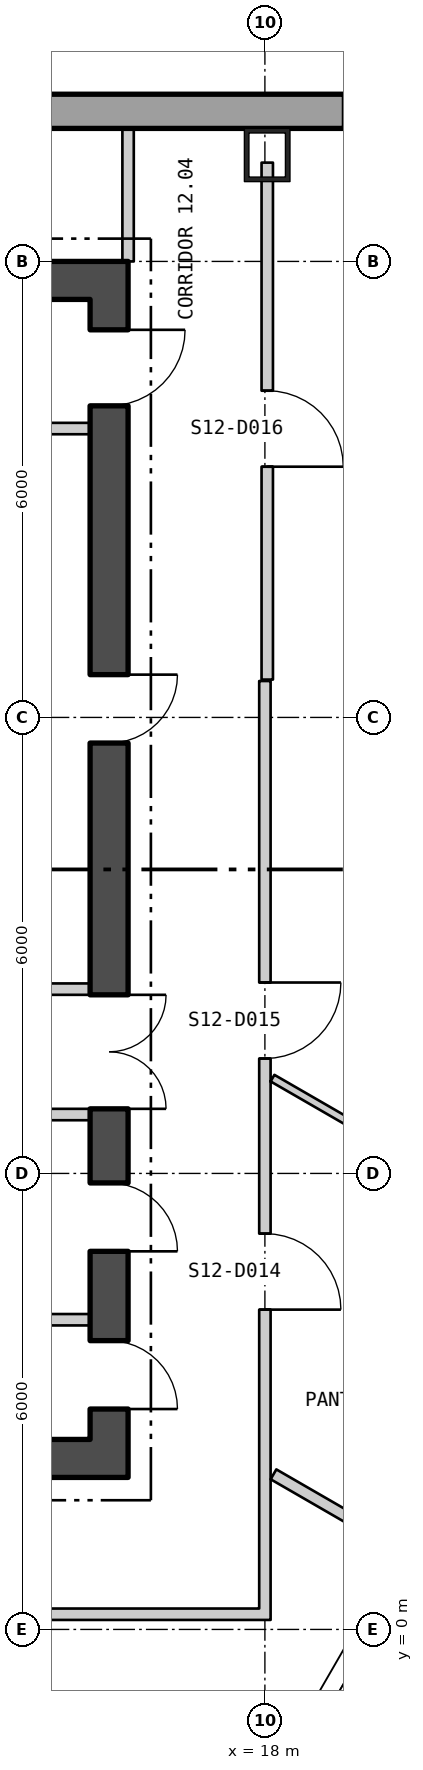
"""IFC4 building model, lengths in metres.
Left out: names, types, materials, properties, quantities, classifications, styles, units other than length and angle.
Written with IfcOpenShell. Run it as: python <this file> out.ifc"""

import sys

from ifc_helpers import new_model, si_unit, direction, frame, frame_2d, origin, origin_2d, place, context, subcontext, project, spatial, polyline, rectangle, hollow_rectangle, outline, extrude, element, fill, save


model = new_model("IFC4")
c1 = context("Model", 3, precision=1e-05, world=origin(), true_north=direction((0.0, 1.0)))
c2 = subcontext(c1, "Body", "Model", "MODEL_VIEW")
j1 = project(units=[si_unit("LENGTHUNIT", "METRE"), si_unit("PLANEANGLEUNIT", "RADIAN")], contexts=[c1])
p1 = place(None, origin())
s1 = spatial("IfcSite", under=j1, at=p1, CompositionType="ELEMENT")
p2 = place(p1, origin())
s2 = spatial("IfcBuilding", under=s1, at=p2, CompositionType="ELEMENT")
p3 = place(p2, frame((0.0, 0.0, 163.2)))
s3 = spatial("IfcBuildingStorey", under=s2, at=p3, CompositionType="ELEMENT", Elevation=163.2)
p4 = place(p3, frame((18.03, 19.4, 0.0), z_axis=(0.0, 0.0, 1.0), x_axis=(-1.0, 0.0, 0.0)))
e1 = element("IfcColumn", 1, at=p4, inside=s3, PredefinedType="COLUMN", context=c2, shape_type="SweptSolid", body=[
    extrude(hollow_rectangle(XDim=0.6, YDim=0.7, WallThickness=0.06, at=origin_2d()), origin(), (0.0, 0.0, 1.0), 3.9),
])
p5 = place(p3, frame((22.87, 19.975, -0.4), z_axis=(0.0, 0.0, 1.0), x_axis=(-1.0, 0.0, 0.0)))
e2 = element("IfcWall", 2, at=p5, inside=s3, PredefinedType="SOLIDWALL", context=c2, shape_type="SweptSolid", body=[
    extrude(outline(polyline([(-0.13, -0.225), (45.87, -0.225), (45.61, 0.225), (0.13, 0.225), (-0.13, -0.225)])), origin(), (0.0, 0.0, 1.0), 3.9),
])
p6 = place(p5, frame((1.424, 0.0, 1.3)))
e3 = element("IfcOpeningElement", 3, at=p6, cuts=e2, PredefinedType="OPENING", context=c2, shape_type="SweptSolid", body=[
    extrude(rectangle(XDim=2.4, YDim=2.0, at=frame_2d((1.2, 1.0))), frame((0.0, 0.235, 0.0), z_axis=(0.0, -1.0, 0.0), x_axis=(1.0, 0.0, 0.0)), (0.0, 0.0, 1.0), 0.47),
])
p7 = place(p5, frame((10.401, 0.0, 1.3)))
e4 = element("IfcOpeningElement", 4, at=p7, cuts=e2, PredefinedType="OPENING", context=c2, shape_type="SweptSolid", body=[
    extrude(rectangle(XDim=2.4, YDim=2.0, at=frame_2d((1.2, 1.0))), frame((0.0, 0.235, 0.0), z_axis=(0.0, -1.0, 0.0), x_axis=(1.0, 0.0, 0.0)), (0.0, 0.0, 1.0), 0.47),
])
p8 = place(p5, frame((14.909, 0.0, 1.3)))
e5 = element("IfcOpeningElement", 5, at=p8, cuts=e2, PredefinedType="OPENING", context=c2, shape_type="SweptSolid", body=[
    extrude(rectangle(XDim=2.4, YDim=2.0, at=frame_2d((1.2, 1.0))), frame((0.0, 0.235, 0.0), z_axis=(0.0, -1.0, 0.0), x_axis=(1.0, 0.0, 0.0)), (0.0, 0.0, 1.0), 0.47),
])
p9 = place(p5, frame((19.416, 0.0, 1.3)))
e6 = element("IfcOpeningElement", 6, at=p9, cuts=e2, PredefinedType="OPENING", context=c2, shape_type="SweptSolid", body=[
    extrude(rectangle(XDim=2.4, YDim=2.0, at=frame_2d((1.2, 1.0))), frame((0.0, 0.235, 0.0), z_axis=(0.0, -1.0, 0.0), x_axis=(1.0, 0.0, 0.0)), (0.0, 0.0, 1.0), 0.47),
])
p10 = place(p5, frame((23.924, 0.0, 1.3)))
e7 = element("IfcOpeningElement", 7, at=p10, cuts=e2, PredefinedType="OPENING", context=c2, shape_type="SweptSolid", body=[
    extrude(rectangle(XDim=2.4, YDim=2.0, at=frame_2d((1.2, 1.0))), frame((0.0, 0.235, 0.0), z_axis=(0.0, -1.0, 0.0), x_axis=(1.0, 0.0, 0.0)), (0.0, 0.0, 1.0), 0.47),
])
p11 = place(p5, frame((28.431, 0.0, 1.3)))
e8 = element("IfcOpeningElement", 8, at=p11, cuts=e2, PredefinedType="OPENING", context=c2, shape_type="SweptSolid", body=[
    extrude(rectangle(XDim=2.4, YDim=2.0, at=frame_2d((1.2, 1.0))), frame((0.0, 0.235, 0.0), z_axis=(0.0, -1.0, 0.0), x_axis=(1.0, 0.0, 0.0)), (0.0, 0.0, 1.0), 0.47),
])
p12 = place(p5, frame((32.939, 0.0, 1.3)))
e9 = element("IfcOpeningElement", 9, at=p12, cuts=e2, PredefinedType="OPENING", context=c2, shape_type="SweptSolid", body=[
    extrude(rectangle(XDim=2.4, YDim=2.0, at=frame_2d((1.2, 1.0))), frame((0.0, 0.235, 0.0), z_axis=(0.0, -1.0, 0.0), x_axis=(1.0, 0.0, 0.0)), (0.0, 0.0, 1.0), 0.47),
])
p13 = place(p5, frame((37.447, 0.0, 1.3)))
e10 = element("IfcOpeningElement", 10, at=p13, cuts=e2, PredefinedType="OPENING", context=c2, shape_type="SweptSolid", body=[
    extrude(rectangle(XDim=2.4, YDim=2.0, at=frame_2d((1.2, 1.0))), frame((0.0, 0.235, 0.0), z_axis=(0.0, -1.0, 0.0), x_axis=(1.0, 0.0, 0.0)), (0.0, 0.0, 1.0), 0.47),
])
p14 = place(p5, frame((41.916, 0.0, 1.3)))
e11 = element("IfcOpeningElement", 11, at=p14, cuts=e2, PredefinedType="OPENING", context=c2, shape_type="SweptSolid", body=[
    extrude(rectangle(XDim=2.4, YDim=2.0, at=frame_2d((1.2, 1.0))), frame((0.0, 0.235, 0.0), z_axis=(0.0, -1.0, 0.0), x_axis=(1.0, 0.0, 0.0)), (0.0, 0.0, 1.0), 0.47),
])
p15 = place(p3, frame((4.055, -26.661, -0.18), z_axis=(0.0, 0.0, 1.0), x_axis=(0.499999764979, 0.866025539474, 0.0)))
e12 = element("IfcWall", 12, at=p15, inside=s3, PredefinedType="SOLIDWALL", context=c2, shape_type="SweptSolid", body=[
    extrude(outline(polyline([(-0.13, -0.225), (45.87, -0.225), (45.61, 0.225), (0.13, 0.225), (-0.13, -0.225)])), origin(), (0.0, 0.0, 1.0), 3.68),
])
p16 = place(p15, frame((1.424, 0.0, 1.08)))
e13 = element("IfcOpeningElement", 13, at=p16, cuts=e12, PredefinedType="OPENING", context=c2, shape_type="SweptSolid", body=[
    extrude(rectangle(XDim=2.4, YDim=2.0, at=frame_2d((1.2, 1.0))), frame((0.0, 0.235, 0.0), z_axis=(0.0, -1.0, 0.0), x_axis=(1.0, 0.0, 0.0)), (0.0, 0.0, 1.0), 0.47),
])
p17 = place(p15, frame((5.893, 0.0, 1.08)))
e14 = element("IfcOpeningElement", 14, at=p17, cuts=e12, PredefinedType="OPENING", context=c2, shape_type="SweptSolid", body=[
    extrude(rectangle(XDim=2.4, YDim=2.0, at=frame_2d((1.2, 1.0))), frame((0.0, 0.235, 0.0), z_axis=(0.0, -1.0, 0.0), x_axis=(1.0, 0.0, 0.0)), (0.0, 0.0, 1.0), 0.47),
])
p18 = place(p15, frame((10.401, 0.0, 1.08)))
e15 = element("IfcOpeningElement", 15, at=p18, cuts=e12, PredefinedType="OPENING", context=c2, shape_type="SweptSolid", body=[
    extrude(rectangle(XDim=2.4, YDim=2.0, at=frame_2d((1.2, 1.0))), frame((0.0, 0.235, 0.0), z_axis=(0.0, -1.0, 0.0), x_axis=(1.0, 0.0, 0.0)), (0.0, 0.0, 1.0), 0.47),
])
p19 = place(p15, frame((14.909, 0.0, 1.08)))
e16 = element("IfcOpeningElement", 16, at=p19, cuts=e12, PredefinedType="OPENING", context=c2, shape_type="SweptSolid", body=[
    extrude(rectangle(XDim=2.4, YDim=2.0, at=frame_2d((1.2, 1.0))), frame((0.0, 0.235, 0.0), z_axis=(0.0, -1.0, 0.0), x_axis=(1.0, 0.0, 0.0)), (0.0, 0.0, 1.0), 0.47),
])
p20 = place(p15, frame((19.416, 0.0, 1.08)))
e17 = element("IfcOpeningElement", 17, at=p20, cuts=e12, PredefinedType="OPENING", context=c2, shape_type="SweptSolid", body=[
    extrude(rectangle(XDim=2.4, YDim=2.0, at=frame_2d((1.2, 1.0))), frame((0.0, 0.235, 0.0), z_axis=(0.0, -1.0, 0.0), x_axis=(1.0, 0.0, 0.0)), (0.0, 0.0, 1.0), 0.47),
])
p21 = place(p15, frame((23.924, 0.0, 1.08)))
e18 = element("IfcOpeningElement", 18, at=p21, cuts=e12, PredefinedType="OPENING", context=c2, shape_type="SweptSolid", body=[
    extrude(rectangle(XDim=2.4, YDim=2.0, at=frame_2d((1.2, 1.0))), frame((0.0, 0.235, 0.0), z_axis=(0.0, -1.0, 0.0), x_axis=(1.0, 0.0, 0.0)), (0.0, 0.0, 1.0), 0.47),
])
p22 = place(p15, frame((28.431, 0.0, 1.08)))
e19 = element("IfcOpeningElement", 19, at=p22, cuts=e12, PredefinedType="OPENING", context=c2, shape_type="SweptSolid", body=[
    extrude(rectangle(XDim=2.4, YDim=2.0, at=frame_2d((1.2, 1.0))), frame((0.0, 0.235, 0.0), z_axis=(0.0, -1.0, 0.0), x_axis=(1.0, 0.0, 0.0)), (0.0, 0.0, 1.0), 0.47),
])
p23 = place(p15, frame((32.939, 0.0, 1.08)))
e20 = element("IfcOpeningElement", 20, at=p23, cuts=e12, PredefinedType="OPENING", context=c2, shape_type="SweptSolid", body=[
    extrude(rectangle(XDim=2.4, YDim=2.0, at=frame_2d((1.2, 1.0))), frame((0.0, 0.235, 0.0), z_axis=(0.0, -1.0, 0.0), x_axis=(1.0, 0.0, 0.0)), (0.0, 0.0, 1.0), 0.47),
])
p24 = place(p15, frame((37.447, 0.0, 1.08)))
e21 = element("IfcOpeningElement", 21, at=p24, cuts=e12, PredefinedType="OPENING", context=c2, shape_type="SweptSolid", body=[
    extrude(rectangle(XDim=2.4, YDim=2.0, at=frame_2d((1.2, 1.0))), frame((0.0, 0.235, 0.0), z_axis=(0.0, -1.0, 0.0), x_axis=(1.0, 0.0, 0.0)), (0.0, 0.0, 1.0), 0.47),
])
p25 = place(p15, frame((41.916, 0.0, 1.08)))
e22 = element("IfcOpeningElement", 22, at=p25, cuts=e12, PredefinedType="OPENING", context=c2, shape_type="SweptSolid", body=[
    extrude(rectangle(XDim=2.4, YDim=2.0, at=frame_2d((1.2, 1.0))), frame((0.0, 0.235, 0.0), z_axis=(0.0, -1.0, 0.0), x_axis=(1.0, 0.0, 0.0)), (0.0, 0.0, 1.0), 0.47),
])
p26 = place(p3, frame((-16.2, 2.25, 0.0), z_axis=(0.0, 0.0, 1.0), x_axis=(1.0, 0.0, 0.0)))
e23 = element("IfcWall", 23, at=p26, inside=s3, PredefinedType="SHEAR", context=c2, shape_type="SweptSolid", body=[
    extrude(rectangle(XDim=32.4, YDim=0.5, at=frame_2d((16.2, 0.0))), origin(), (0.0, 0.0, 1.0), 3.7),
])
p27 = place(p26, frame((10.7, 0.0, 0.0)))
e24 = element("IfcOpeningElement", 24, at=p27, cuts=e23, PredefinedType="OPENING", context=c2, shape_type="SweptSolid", body=[
    extrude(rectangle(XDim=1.8, YDim=2.4, at=frame_2d((0.9, 1.2))), frame((0.0, 0.26, 0.0), z_axis=(0.0, -1.0, 0.0), x_axis=(1.0, 0.0, 0.0)), (0.0, 0.0, 1.0), 0.52),
])
p28 = place(p26, frame((20.7, 0.0, 0.0)))
e25 = element("IfcOpeningElement", 25, at=p28, cuts=e23, PredefinedType="OPENING", context=c2, shape_type="SweptSolid", body=[
    extrude(rectangle(XDim=1.8, YDim=2.4, at=frame_2d((0.9, 1.2))), frame((0.0, 0.26, 0.0), z_axis=(0.0, -1.0, 0.0), x_axis=(1.0, 0.0, 0.0)), (0.0, 0.0, 1.0), 0.52),
])
p29 = place(p3, frame((-16.2, 17.75, 0.0), z_axis=(0.0, 0.0, 1.0), x_axis=(1.0, 0.0, 0.0)))
e26 = element("IfcWall", 26, at=p29, inside=s3, PredefinedType="SHEAR", context=c2, shape_type="SweptSolid", body=[
    extrude(rectangle(XDim=32.4, YDim=0.5, at=frame_2d((16.2, 0.0))), origin(), (0.0, 0.0, 1.0), 3.7),
])
p30 = place(p3, frame((15.95, 2.5, 0.0), z_axis=(0.0, 0.0, 1.0), x_axis=(0.0, 1.0, 0.0)))
e27 = element("IfcWall", 27, at=p30, inside=s3, PredefinedType="SHEAR", context=c2, shape_type="SweptSolid", body=[
    extrude(rectangle(XDim=15.0, YDim=0.5, at=frame_2d((7.5, 0.0))), origin(), (0.0, 0.0, 1.0), 3.7),
])
p31 = place(p30, frame((4.35, 0.0, 0.0)))
e28 = element("IfcOpeningElement", 28, at=p31, cuts=e27, PredefinedType="OPENING", context=c2, shape_type="SweptSolid", body=[
    extrude(rectangle(XDim=1.5, YDim=2.1, at=frame_2d((0.75, 1.05))), frame((0.0, 0.26, 0.0), z_axis=(0.0, -1.0, 0.0), x_axis=(1.0, 0.0, 0.0)), (0.0, 0.0, 1.0), 0.52),
])
p32 = place(p30, frame((0.4, 0.0, 0.0)))
e29 = element("IfcOpeningElement", 29, at=p32, cuts=e27, PredefinedType="OPENING", context=c2, shape_type="SweptSolid", body=[
    extrude(rectangle(XDim=0.9, YDim=2.1, at=frame_2d((0.45, 1.05))), frame((0.0, 0.26, 0.0), z_axis=(0.0, -1.0, 0.0), x_axis=(1.0, 0.0, 0.0)), (0.0, 0.0, 1.0), 0.52),
])
p33 = place(p30, frame((2.475, 0.0, 0.0)))
e30 = element("IfcOpeningElement", 30, at=p33, cuts=e27, PredefinedType="OPENING", context=c2, shape_type="SweptSolid", body=[
    extrude(rectangle(XDim=0.9, YDim=2.1, at=frame_2d((0.45, 1.05))), frame((0.0, 0.26, 0.0), z_axis=(0.0, -1.0, 0.0), x_axis=(1.0, 0.0, 0.0)), (0.0, 0.0, 1.0), 0.52),
])
p34 = place(p30, frame((9.163, 0.0, 0.0)))
e31 = element("IfcOpeningElement", 31, at=p34, cuts=e27, PredefinedType="OPENING", context=c2, shape_type="SweptSolid", body=[
    extrude(rectangle(XDim=0.9, YDim=2.1, at=frame_2d((0.45, 1.05))), frame((0.0, 0.26, 0.0), z_axis=(0.0, -1.0, 0.0), x_axis=(1.0, 0.0, 0.0)), (0.0, 0.0, 1.0), 0.52),
])
p35 = place(p30, frame((13.6, 0.0, 0.0)))
e32 = element("IfcOpeningElement", 32, at=p35, cuts=e27, PredefinedType="OPENING", context=c2, shape_type="SweptSolid", body=[
    extrude(rectangle(XDim=1.0, YDim=2.1, at=frame_2d((0.5, 1.05))), frame((0.0, 0.26, 0.0), z_axis=(0.0, -1.0, 0.0), x_axis=(1.0, 0.0, 0.0)), (0.0, 0.0, 1.0), 0.52),
])
for number, where, z_axis, x_axis in (
    (33, (14.5, 6.775, 0.0), (0.0, 0.0, 1.0), (1.0, 0.0, 0.0)),
    (34, (14.5, 8.425, 0.0), (0.0, 0.0, 1.0), (1.0, 0.0, 0.0)),
    (35, (14.5, 4.075, 0.0), (0.0, 0.0, 1.0), (1.0, 0.0, 0.0)),
    (36, (14.5, 15.801, 0.0), (0.0, 0.0, 1.0), (1.0, 0.0, 0.0)),
):
    element("IfcWall", number, at=place(p3, frame(where, z_axis=z_axis, x_axis=x_axis)), inside=s3, PredefinedType="PARTITIONING", context=c2, shape_type="SweptSolid", body=[
        extrude(rectangle(XDim=1.2, YDim=0.15, at=frame_2d((0.6, 0.0))), origin(), (0.0, 0.0, 1.0), 3.7),
    ])
p36 = place(p3, frame((7.09, 0.2, 0.0), z_axis=(0.0, 0.0, 1.0), x_axis=(1.0, 0.0, 0.0)))
e37 = element("IfcWall", 37, at=p36, inside=s3, PredefinedType="PARTITIONING", context=c2, shape_type="SweptSolid", body=[
    extrude(rectangle(XDim=10.835, YDim=0.15, at=frame_2d((5.418, 0.0))), origin(), (0.0, 0.0, 1.0), 3.7),
])
p37 = place(p3, frame((16.2, 18.0, 0.0), z_axis=(0.0, 0.0, 1.0), x_axis=(0.0, 1.0, 0.0)))
e38 = element("IfcWall", 38, at=p37, inside=s3, PredefinedType="PARTITIONING", context=c2, shape_type="SweptSolid", body=[
    extrude(rectangle(XDim=1.75, YDim=0.15, at=frame_2d((0.875, 0.0))), origin(), (0.0, 0.0, 1.0), 3.7),
])
p38 = place(p3, frame((18.0, 0.125, 0.0), z_axis=(0.0, 0.0, 1.0), x_axis=(0.0, 1.0, 0.0)))
e39 = element("IfcWall", 39, at=p38, inside=s3, PredefinedType="PARTITIONING", context=c2, shape_type="SweptSolid", body=[
    extrude(rectangle(XDim=12.354, YDim=0.15, at=frame_2d((6.177, 0.0))), origin(), (0.0, 0.0, 1.0), 3.7),
])
p39 = place(p38, frame((4.083, 0.0, 0.0)))
e40 = element("IfcOpeningElement", 40, at=p39, cuts=e39, PredefinedType="OPENING", context=c2, shape_type="SweptSolid", body=[
    extrude(rectangle(XDim=1.0, YDim=2.1, at=frame_2d((0.5, 1.05))), frame((0.0, 0.085, 0.0), z_axis=(0.0, -1.0, 0.0), x_axis=(1.0, 0.0, 0.0)), (0.0, 0.0, 1.0), 0.17),
])
p40 = place(p38, frame((7.387, 0.0, 0.0)))
e41 = element("IfcOpeningElement", 41, at=p40, cuts=e39, PredefinedType="OPENING", context=c2, shape_type="SweptSolid", body=[
    extrude(rectangle(XDim=1.0, YDim=2.1, at=frame_2d((0.5, 1.05))), frame((0.0, 0.085, 0.0), z_axis=(0.0, -1.0, 0.0), x_axis=(1.0, 0.0, 0.0)), (0.0, 0.0, 1.0), 0.17),
])
p41 = place(p3, frame((18.031, 12.498, 0.0), z_axis=(0.0, 0.0, 1.0), x_axis=(0.0, 1.0, 0.0)))
e42 = element("IfcWall", 42, at=p41, inside=s3, PredefinedType="PARTITIONING", context=c2, shape_type="SweptSolid", body=[
    extrude(rectangle(XDim=6.802, YDim=0.15, at=frame_2d((3.401, 0.0))), origin(), (0.0, 0.0, 1.0), 3.7),
])
p42 = place(p41, frame((2.801, 0.0, 0.0)))
e43 = element("IfcOpeningElement", 43, at=p42, cuts=e42, PredefinedType="OPENING", context=c2, shape_type="SweptSolid", body=[
    extrude(rectangle(XDim=1.0, YDim=2.1, at=frame_2d((0.5, 1.05))), frame((0.0, 0.085, 0.0), z_axis=(0.0, -1.0, 0.0), x_axis=(1.0, 0.0, 0.0)), (0.0, 0.0, 1.0), 0.17),
])
p43 = place(p3, frame((18.1, 7.254, 0.0), z_axis=(0.0, 0.0, 1.0), x_axis=(0.865963207503, -0.50010771165, 0.0)))
e44 = element("IfcWall", 44, at=p43, inside=s3, PredefinedType="PARTITIONING", context=c2, shape_type="SweptSolid", body=[
    extrude(rectangle(XDim=4.119, YDim=0.1, at=frame_2d((2.06, 0.0))), origin(), (0.0, 0.0, 1.0), 3.7),
])
p44 = place(p3, frame((18.113, 2.041, 0.0), z_axis=(0.0, 0.0, 1.0), x_axis=(0.865897129857, -0.500222111171, 0.0)))
e45 = element("IfcWall", 45, at=p44, inside=s3, PredefinedType="PARTITIONING", context=c2, shape_type="SweptSolid", body=[
    extrude(rectangle(XDim=1.501, YDim=0.15, at=frame_2d((0.751, 0.0))), origin(), (0.0, 0.0, 1.0), 3.7),
])
p45 = place(p22, origin())
e46 = element("IfcWindow", 46, at=p45, inside=s3, PartitioningType="SINGLE_PANEL", PredefinedType="WINDOW", context=c2, shape_type="SweptSolid", body=[
    extrude(rectangle(XDim=2.4, YDim=2.0, at=frame_2d((1.2, 1.0))), frame((0.0, 0.105, 0.0), z_axis=(0.0, -1.0, 0.0), x_axis=(1.0, 0.0, 0.0)), (0.0, 0.0, 1.0), 0.06),
])
fill(e19, e46)
p46 = place(p31, origin())
e47 = element("IfcDoor", 47, at=p46, inside=s3, OperationType="DOUBLE_DOOR_SINGLE_SWING", PredefinedType="DOOR", context=c2, shape_type="SweptSolid", body=[
    extrude(rectangle(XDim=1.5, YDim=2.1, at=frame_2d((0.75, 1.05))), frame((0.0, 0.025, 0.0), z_axis=(0.0, -1.0, 0.0), x_axis=(1.0, 0.0, 0.0)), (0.0, 0.0, 1.0), 0.05),
])
fill(e28, e47)
p47 = place(p32, origin())
e48 = element("IfcDoor", 48, at=p47, inside=s3, OperationType="SINGLE_SWING_LEFT", PredefinedType="DOOR", context=c2, shape_type="SweptSolid", body=[
    extrude(rectangle(XDim=0.9, YDim=2.1, at=frame_2d((0.45, 1.05))), frame((0.0, 0.025, 0.0), z_axis=(0.0, -1.0, 0.0), x_axis=(1.0, 0.0, 0.0)), (0.0, 0.0, 1.0), 0.05),
])
fill(e29, e48)
p48 = place(p33, origin())
e49 = element("IfcDoor", 49, at=p48, inside=s3, OperationType="SINGLE_SWING_LEFT", PredefinedType="DOOR", context=c2, shape_type="SweptSolid", body=[
    extrude(rectangle(XDim=0.9, YDim=2.1, at=frame_2d((0.45, 1.05))), frame((0.0, 0.025, 0.0), z_axis=(0.0, -1.0, 0.0), x_axis=(1.0, 0.0, 0.0)), (0.0, 0.0, 1.0), 0.05),
])
fill(e30, e49)
p49 = place(p34, origin())
e50 = element("IfcDoor", 50, at=p49, inside=s3, OperationType="SINGLE_SWING_RIGHT", PredefinedType="DOOR", context=c2, shape_type="SweptSolid", body=[
    extrude(rectangle(XDim=0.9, YDim=2.1, at=frame_2d((0.45, 1.05))), frame((0.0, 0.025, 0.0), z_axis=(0.0, -1.0, 0.0), x_axis=(1.0, 0.0, 0.0)), (0.0, 0.0, 1.0), 0.05),
])
fill(e31, e50)
p50 = place(p35, origin())
e51 = element("IfcDoor", 51, at=p50, inside=s3, OperationType="SINGLE_SWING_RIGHT", PredefinedType="DOOR", context=c2, shape_type="SweptSolid", body=[
    extrude(rectangle(XDim=1.0, YDim=2.1, at=frame_2d((0.5, 1.05))), frame((0.0, 0.025, 0.0), z_axis=(0.0, -1.0, 0.0), x_axis=(1.0, 0.0, 0.0)), (0.0, 0.0, 1.0), 0.05),
])
fill(e32, e51)
p51 = place(p39, origin())
e52 = element("IfcDoor", 52, at=p51, inside=s3, OperationType="SINGLE_SWING_LEFT", PredefinedType="DOOR", context=c2, shape_type="SweptSolid", body=[
    extrude(rectangle(XDim=1.0, YDim=2.1, at=frame_2d((0.5, 1.05))), frame((0.0, 0.025, 0.0), z_axis=(0.0, -1.0, 0.0), x_axis=(1.0, 0.0, 0.0)), (0.0, 0.0, 1.0), 0.05),
])
fill(e40, e52)
p52 = place(p40, origin())
e53 = element("IfcDoor", 53, at=p52, inside=s3, OperationType="SINGLE_SWING_RIGHT", PredefinedType="DOOR", context=c2, shape_type="SweptSolid", body=[
    extrude(rectangle(XDim=1.0, YDim=2.1, at=frame_2d((0.5, 1.05))), frame((0.0, 0.025, 0.0), z_axis=(0.0, -1.0, 0.0), x_axis=(1.0, 0.0, 0.0)), (0.0, 0.0, 1.0), 0.05),
])
fill(e41, e53)
p53 = place(p42, origin())
e54 = element("IfcDoor", 54, at=p53, inside=s3, OperationType="SINGLE_SWING_LEFT", PredefinedType="DOOR", context=c2, shape_type="SweptSolid", body=[
    extrude(rectangle(XDim=1.0, YDim=2.1, at=frame_2d((0.5, 1.05))), frame((0.0, 0.025, 0.0), z_axis=(0.0, -1.0, 0.0), x_axis=(1.0, 0.0, 0.0)), (0.0, 0.0, 1.0), 0.05),
])
fill(e43, e54)
save(model, sys.argv[1])
